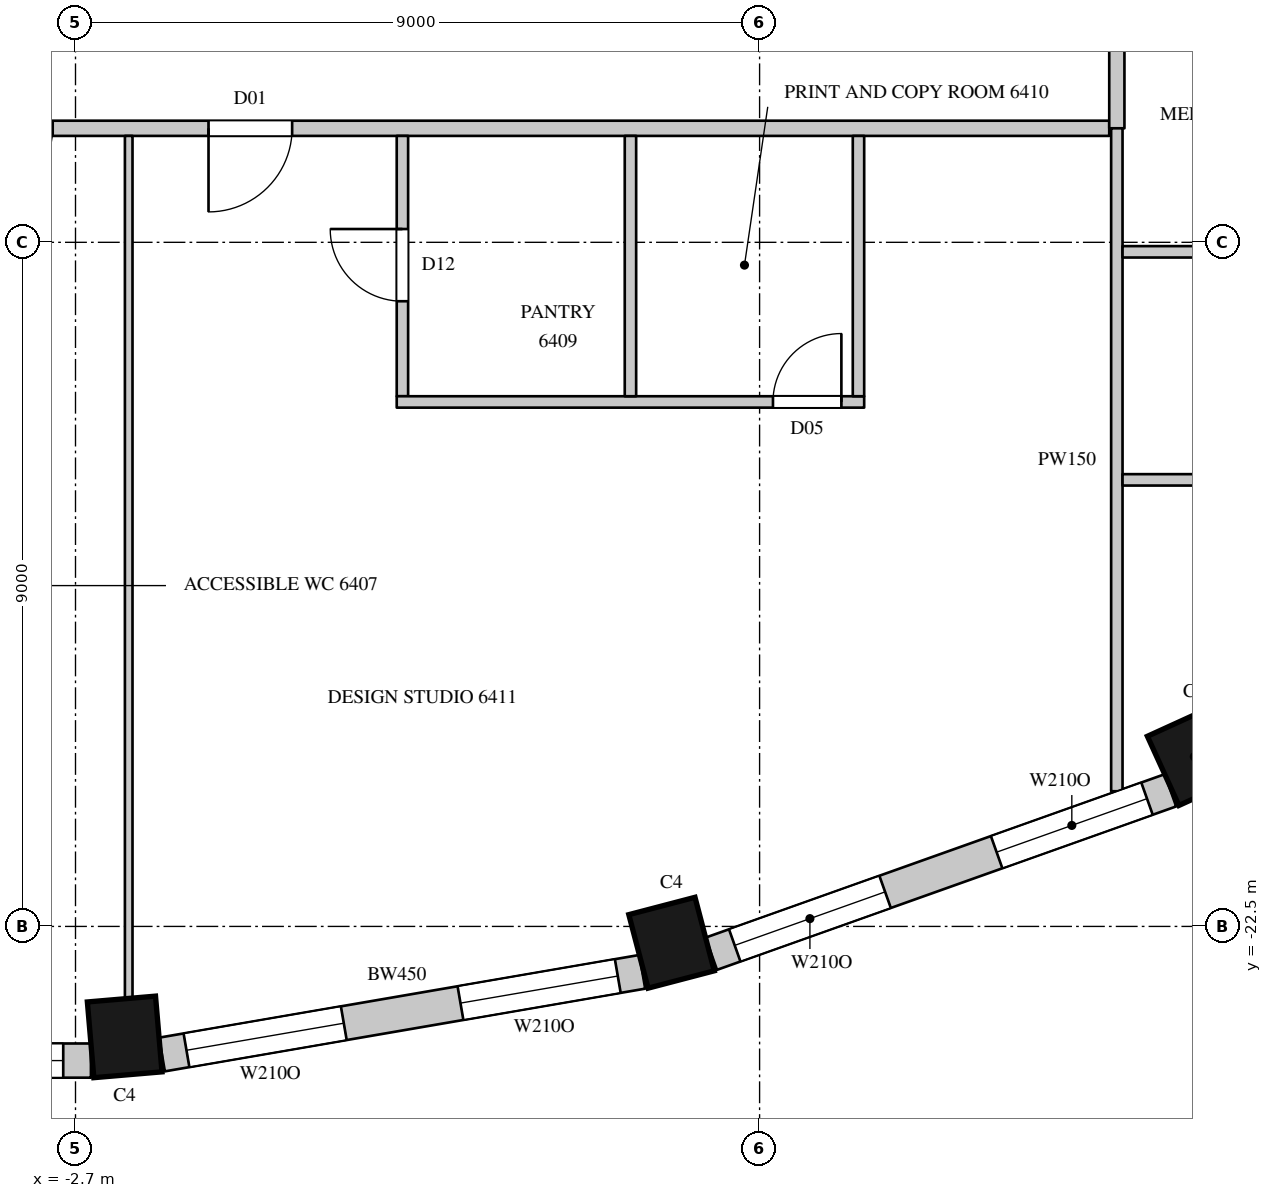
"""IFC4 building model, lengths in metres.
Left out: names, types, materials, properties, quantities, classifications, styles, units other than length and angle.
Written with IfcOpenShell. Run it as: python <this file> out.ifc"""

import sys

from ifc_helpers import new_model, si_unit, direction, frame, frame_2d, origin, origin_2d, place, context, subcontext, project, spatial, rectangle, extrude, element, fill, save


model = new_model("IFC4")
c1 = context("Model", 3, precision=1e-05, world=origin(), true_north=direction((0.0, 1.0)))
c2 = subcontext(c1, "Body", "Model", "MODEL_VIEW")
j1 = project(units=[si_unit("LENGTHUNIT", "METRE"), si_unit("PLANEANGLEUNIT", "RADIAN")], contexts=[c1])
p1 = place(None, origin())
s1 = spatial("IfcSite", under=j1, at=p1, CompositionType="ELEMENT")
p2 = place(p1, origin())
s2 = spatial("IfcBuilding", under=s1, at=p2, CompositionType="ELEMENT")
p3 = place(p2, frame((0.0, 0.0, 284.4)))
s3 = spatial("IfcBuildingStorey", under=s2, at=p3, CompositionType="ELEMENT", Elevation=284.4)
for number, where, z_axis, x_axis in (
    (1, (-2.053, -23.954, 0.0), (0.0, 0.0, 1.0), (0.996, 0.085, 0.0)),
    (2, (5.142, -22.715, 0.0), (0.0, 0.0, 1.0), (0.967, 0.253, 0.0)),
    (3, (12.019, -20.267, 0.0), (0.0, 0.0, 1.0), (0.91, 0.415, 0.0)),
):
    element("IfcColumn", number, at=place(p3, frame(where, z_axis=z_axis, x_axis=x_axis)), inside=s3, PredefinedType="COLUMN", context=c2, shape_type="SweptSolid", body=[
        extrude(rectangle(XDim=0.9, YDim=1.0, at=origin_2d()), origin(), (0.0, 0.0, 1.0), 4.1),
    ])
p4 = place(p3, frame((-8.903, -24.265, 0.0), z_axis=(0.0, 0.0, 1.0), x_axis=(1.0, 0.0, 0.0)))
e4 = element("IfcWall", 4, at=p4, inside=s3, PredefinedType="SOLIDWALL", context=c2, shape_type="SweptSolid", body=[
    extrude(rectangle(XDim=6.406, YDim=0.45, at=frame_2d((3.203, 0.0))), origin(), (0.0, 0.0, 1.0), 3.8),
])
p5 = place(p4, frame((1.514, 0.0, 1.05)))
e5 = element("IfcOpeningElement", 5, at=p5, cuts=e4, PredefinedType="OPENING", context=c2, shape_type="SweptSolid", body=[
    extrude(rectangle(XDim=0.9, YDim=2.4, at=frame_2d((0.45, 1.2))), frame((0.0, 0.235, 0.0), z_axis=(0.0, -1.0, 0.0), x_axis=(1.0, 0.0, 0.0)), (0.0, 0.0, 1.0), 0.47),
])
p6 = place(p4, frame((4.841, 0.0, 1.05)))
e6 = element("IfcOpeningElement", 6, at=p6, cuts=e4, PredefinedType="OPENING", context=c2, shape_type="SweptSolid", body=[
    extrude(rectangle(XDim=1.2, YDim=2.4, at=frame_2d((0.6, 1.2))), frame((0.0, 0.235, 0.0), z_axis=(0.0, -1.0, 0.0), x_axis=(1.0, 0.0, 0.0)), (0.0, 0.0, 1.0), 0.47),
])
p7 = place(p3, frame((-1.562, -24.185, 0.0), z_axis=(0.0, 0.0, 1.0), x_axis=(0.985502073964, 0.169663379113, 0.0)))
e7 = element("IfcWall", 7, at=p7, inside=s3, PredefinedType="SOLIDWALL", context=c2, shape_type="SweptSolid", body=[
    extrude(rectangle(XDim=6.412, YDim=0.45, at=frame_2d((3.206, 0.0))), origin(), (0.0, 0.0, 1.0), 3.8),
])
p8 = place(p7, frame((0.327, 0.0, 1.05)))
e8 = element("IfcOpeningElement", 8, at=p8, cuts=e7, PredefinedType="OPENING", context=c2, shape_type="SweptSolid", body=[
    extrude(rectangle(XDim=2.1, YDim=2.4, at=frame_2d((1.05, 1.2))), frame((0.0, 0.235, 0.0), z_axis=(0.0, -1.0, 0.0), x_axis=(1.0, 0.0, 0.0)), (0.0, 0.0, 1.0), 0.47),
])
p9 = place(p7, frame((3.985, 0.0, 1.05)))
e9 = element("IfcOpeningElement", 9, at=p9, cuts=e7, PredefinedType="OPENING", context=c2, shape_type="SweptSolid", body=[
    extrude(rectangle(XDim=2.1, YDim=2.4, at=frame_2d((1.05, 1.2))), frame((0.0, 0.235, 0.0), z_axis=(0.0, -1.0, 0.0), x_axis=(1.0, 0.0, 0.0)), (0.0, 0.0, 1.0), 0.47),
])
p10 = place(p3, frame((5.665, -22.859, 0.0), z_axis=(0.0, 0.0, 1.0), x_axis=(0.942108340262, 0.335308626803, 0.0)))
e10 = element("IfcWall", 10, at=p10, inside=s3, PredefinedType="SOLIDWALL", context=c2, shape_type="SweptSolid", body=[
    extrude(rectangle(XDim=6.412, YDim=0.45, at=frame_2d((3.206, 0.0))), origin(), (0.0, 0.0, 1.0), 3.8),
])
p11 = place(p10, frame((0.327, 0.0, 1.05)))
e11 = element("IfcOpeningElement", 11, at=p11, cuts=e10, PredefinedType="OPENING", context=c2, shape_type="SweptSolid", body=[
    extrude(rectangle(XDim=2.1, YDim=2.4, at=frame_2d((1.05, 1.2))), frame((0.0, 0.235, 0.0), z_axis=(0.0, -1.0, 0.0), x_axis=(1.0, 0.0, 0.0)), (0.0, 0.0, 1.0), 0.47),
])
p12 = place(p10, frame((3.985, 0.0, 1.05)))
e12 = element("IfcOpeningElement", 12, at=p12, cuts=e10, PredefinedType="OPENING", context=c2, shape_type="SweptSolid", body=[
    extrude(rectangle(XDim=2.1, YDim=2.4, at=frame_2d((1.05, 1.2))), frame((0.0, 0.235, 0.0), z_axis=(0.0, -1.0, 0.0), x_axis=(1.0, 0.0, 0.0)), (0.0, 0.0, 1.0), 0.47),
])
p13 = place(p3, frame((-10.9, -12.0, 0.0), z_axis=(0.0, 0.0, 1.0), x_axis=(1.0, 0.0, 0.0)))
e13 = element("IfcWall", 13, at=p13, inside=s3, PredefinedType="PARTITIONING", context=c2, shape_type="SweptSolid", body=[
    extrude(rectangle(XDim=21.8, YDim=0.2, at=frame_2d((10.9, 0.0))), origin(), (0.0, 0.0, 1.0), 3.8),
])
p14 = place(p13, frame((1.1, 0.0, 0.0)))
e14 = element("IfcOpeningElement", 14, at=p14, cuts=e13, PredefinedType="OPENING", context=c2, shape_type="SweptSolid", body=[
    extrude(rectangle(XDim=0.9, YDim=2.2, at=frame_2d((0.45, 1.1))), frame((0.0, 0.11, 0.0), z_axis=(0.0, -1.0, 0.0), x_axis=(1.0, 0.0, 0.0)), (0.0, 0.0, 1.0), 0.22),
])
p15 = place(p13, frame((4.9, 0.0, 0.0)))
e15 = element("IfcOpeningElement", 15, at=p15, cuts=e13, PredefinedType="OPENING", context=c2, shape_type="SweptSolid", body=[
    extrude(rectangle(XDim=0.9, YDim=2.2, at=frame_2d((0.45, 1.1))), frame((0.0, 0.11, 0.0), z_axis=(0.0, -1.0, 0.0), x_axis=(1.0, 0.0, 0.0)), (0.0, 0.0, 1.0), 0.22),
])
p16 = place(p13, frame((7.0, 0.0, 0.0)))
e16 = element("IfcOpeningElement", 16, at=p16, cuts=e13, PredefinedType="OPENING", context=c2, shape_type="SweptSolid", body=[
    extrude(rectangle(XDim=0.9, YDim=2.2, at=frame_2d((0.45, 1.1))), frame((0.0, 0.11, 0.0), z_axis=(0.0, -1.0, 0.0), x_axis=(1.0, 0.0, 0.0)), (0.0, 0.0, 1.0), 0.22),
])
p17 = place(p13, frame((9.95, 0.0, 0.0)))
e17 = element("IfcOpeningElement", 17, at=p17, cuts=e13, PredefinedType="OPENING", context=c2, shape_type="SweptSolid", body=[
    extrude(rectangle(XDim=1.1, YDim=2.4, at=frame_2d((0.55, 1.2))), frame((0.0, 0.11, 0.0), z_axis=(0.0, -1.0, 0.0), x_axis=(1.0, 0.0, 0.0)), (0.0, 0.0, 1.0), 0.22),
])
p18 = place(p3, frame((11.0, -12.0, 0.0), z_axis=(0.0, 0.0, 1.0), x_axis=(0.0, 1.0, 0.0)))
e18 = element("IfcWall", 18, at=p18, inside=s3, PredefinedType="PARTITIONING", context=c2, shape_type="SweptSolid", body=[
    extrude(rectangle(XDim=24.1, YDim=0.2, at=frame_2d((12.05, 0.0))), origin(), (0.0, 0.0, 1.0), 3.8),
])
p19 = place(p18, frame((9.85, 0.0, 0.0)))
e19 = element("IfcOpeningElement", 19, at=p19, cuts=e18, PredefinedType="OPENING", context=c2, shape_type="SweptSolid", body=[
    extrude(rectangle(XDim=1.5, YDim=2.4, at=frame_2d((0.75, 1.2))), frame((0.0, 0.11, 0.0), z_axis=(0.0, -1.0, 0.0), x_axis=(1.0, 0.0, 0.0)), (0.0, 0.0, 1.0), 0.22),
])
p20 = place(p18, frame((4.55, 0.0, 0.0)))
e20 = element("IfcOpeningElement", 20, at=p20, cuts=e18, PredefinedType="OPENING", context=c2, shape_type="SweptSolid", body=[
    extrude(rectangle(XDim=1.1, YDim=2.4, at=frame_2d((0.55, 1.2))), frame((0.0, 0.11, 0.0), z_axis=(0.0, -1.0, 0.0), x_axis=(1.0, 0.0, 0.0)), (0.0, 0.0, 1.0), 0.22),
])
p21 = place(p3, frame((1.601, -15.525, 0.0), z_axis=(0.0, 0.0, 1.0), x_axis=(0.0, 1.0, 0.0)))
e21 = element("IfcWall", 21, at=p21, inside=s3, PredefinedType="PARTITIONING", context=c2, shape_type="SweptSolid", body=[
    extrude(rectangle(XDim=3.425, YDim=0.15, at=frame_2d((1.712, 0.0))), origin(), (0.0, 0.0, 1.0), 3.8),
])
p22 = place(p21, frame((1.25, 0.0, 0.0)))
e22 = element("IfcOpeningElement", 22, at=p22, cuts=e21, PredefinedType="OPENING", context=c2, shape_type="SweptSolid", body=[
    extrude(rectangle(XDim=0.95, YDim=2.2, at=frame_2d((0.475, 1.1))), frame((0.0, 0.085, 0.0), z_axis=(0.0, -1.0, 0.0), x_axis=(1.0, 0.0, 0.0)), (0.0, 0.0, 1.0), 0.17),
])
p23 = place(p3, frame((1.526, -15.6, 0.0), z_axis=(0.0, 0.0, 1.0), x_axis=(1.0, 0.0, 0.0)))
e23 = element("IfcWall", 23, at=p23, inside=s3, PredefinedType="PARTITIONING", context=c2, shape_type="SweptSolid", body=[
    extrude(rectangle(XDim=6.15, YDim=0.15, at=frame_2d((3.075, 0.0))), origin(), (0.0, 0.0, 1.0), 3.8),
])
p24 = place(p23, frame((4.95, 0.0, 0.0)))
e24 = element("IfcOpeningElement", 24, at=p24, cuts=e23, PredefinedType="OPENING", context=c2, shape_type="SweptSolid", body=[
    extrude(rectangle(XDim=0.9, YDim=2.2, at=frame_2d((0.45, 1.1))), frame((0.0, 0.085, 0.0), z_axis=(0.0, -1.0, 0.0), x_axis=(1.0, 0.0, 0.0)), (0.0, 0.0, 1.0), 0.17),
])
for number, where, z_axis, x_axis in (
    (25, (4.601, -15.525, 0.0), (0.0, 0.0, 1.0), (0.0, 1.0, 0.0)),
    (26, (7.601, -15.525, 0.0), (0.0, 0.0, 1.0), (0.0, 1.0, 0.0)),
):
    element("IfcWall", number, at=place(p3, frame(where, z_axis=z_axis, x_axis=x_axis)), inside=s3, PredefinedType="PARTITIONING", context=c2, shape_type="SweptSolid", body=[
        extrude(rectangle(XDim=3.425, YDim=0.15, at=frame_2d((1.712, 0.0))), origin(), (0.0, 0.0, 1.0), 3.8),
    ])
p25 = place(p3, frame((11.0, -20.721, 0.0), z_axis=(0.0, 0.0, 1.0), x_axis=(0.0, 1.0, 0.0)))
e27 = element("IfcWall", 27, at=p25, inside=s3, PredefinedType="PARTITIONING", context=c2, shape_type="SweptSolid", body=[
    extrude(rectangle(XDim=8.721, YDim=0.15, at=frame_2d((4.361, 0.0))), origin(), (0.0, 0.0, 1.0), 3.8),
])
p26 = place(p3, frame((11.075, -16.625, 0.0), z_axis=(0.0, 0.0, 1.0), x_axis=(1.0, 0.0, 0.0)))
e28 = element("IfcWall", 28, at=p26, inside=s3, PredefinedType="PARTITIONING", context=c2, shape_type="SweptSolid", body=[
    extrude(rectangle(XDim=3.9, YDim=0.15, at=frame_2d((1.95, 0.0))), origin(), (0.0, 0.0, 1.0), 3.8),
])
p27 = place(p26, frame((1.4, 0.0, 0.0)))
e29 = element("IfcOpeningElement", 29, at=p27, cuts=e28, PredefinedType="OPENING", context=c2, shape_type="SweptSolid", body=[
    extrude(rectangle(XDim=0.95, YDim=2.2, at=frame_2d((0.475, 1.1))), frame((0.0, 0.085, 0.0), z_axis=(0.0, -1.0, 0.0), x_axis=(1.0, 0.0, 0.0)), (0.0, 0.0, 1.0), 0.17),
])
p28 = place(p3, frame((11.075, -13.625, 0.0), z_axis=(0.0, 0.0, 1.0), x_axis=(1.0, 0.0, 0.0)))
e30 = element("IfcWall", 30, at=p28, inside=s3, PredefinedType="PARTITIONING", context=c2, shape_type="SweptSolid", body=[
    extrude(rectangle(XDim=3.75, YDim=0.15, at=frame_2d((1.875, 0.0))), origin(), (0.0, 0.0, 1.0), 3.8),
])
p29 = place(p3, frame((-2.0, -23.447, 0.0), z_axis=(0.0, 0.0, 1.0), x_axis=(0.0, 1.0, 0.0)))
e31 = element("IfcWall", 31, at=p29, inside=s3, PredefinedType="PARTITIONING", context=c2, shape_type="SweptSolid", body=[
    extrude(rectangle(XDim=11.347, YDim=0.1, at=frame_2d((5.674, 0.0))), origin(), (0.0, 0.0, 1.0), 3.8),
])
p30 = place(p8, origin())
e32 = element("IfcWindow", 32, at=p30, inside=s3, PartitioningType="SINGLE_PANEL", PredefinedType="WINDOW", context=c2, shape_type="SweptSolid", body=[
    extrude(rectangle(XDim=2.1, YDim=2.4, at=frame_2d((1.05, 1.2))), frame((0.0, 0.135, 0.0), z_axis=(0.0, -1.0, 0.0), x_axis=(1.0, 0.0, 0.0)), (0.0, 0.0, 1.0), 0.06),
])
fill(e8, e32)
p31 = place(p9, origin())
e33 = element("IfcWindow", 33, at=p31, inside=s3, PartitioningType="SINGLE_PANEL", PredefinedType="WINDOW", context=c2, shape_type="SweptSolid", body=[
    extrude(rectangle(XDim=2.1, YDim=2.4, at=frame_2d((1.05, 1.2))), frame((0.0, 0.135, 0.0), z_axis=(0.0, -1.0, 0.0), x_axis=(1.0, 0.0, 0.0)), (0.0, 0.0, 1.0), 0.06),
])
fill(e9, e33)
p32 = place(p11, origin())
e34 = element("IfcWindow", 34, at=p32, inside=s3, PartitioningType="SINGLE_PANEL", PredefinedType="WINDOW", context=c2, shape_type="SweptSolid", body=[
    extrude(rectangle(XDim=2.1, YDim=2.4, at=frame_2d((1.05, 1.2))), frame((0.0, 0.135, 0.0), z_axis=(0.0, -1.0, 0.0), x_axis=(1.0, 0.0, 0.0)), (0.0, 0.0, 1.0), 0.06),
])
fill(e11, e34)
p33 = place(p12, origin())
e35 = element("IfcWindow", 35, at=p33, inside=s3, PartitioningType="SINGLE_PANEL", PredefinedType="WINDOW", context=c2, shape_type="SweptSolid", body=[
    extrude(rectangle(XDim=2.1, YDim=2.4, at=frame_2d((1.05, 1.2))), frame((0.0, 0.135, 0.0), z_axis=(0.0, -1.0, 0.0), x_axis=(1.0, 0.0, 0.0)), (0.0, 0.0, 1.0), 0.06),
])
fill(e12, e35)
p34 = place(p17, origin())
e36 = element("IfcDoor", 36, at=p34, inside=s3, OperationType="SINGLE_SWING_RIGHT", PredefinedType="DOOR", context=c2, shape_type="SweptSolid", body=[
    extrude(rectangle(XDim=1.1, YDim=2.4, at=frame_2d((0.55, 1.2))), frame((0.0, 0.025, 0.0), z_axis=(0.0, -1.0, 0.0), x_axis=(1.0, 0.0, 0.0)), (0.0, 0.0, 1.0), 0.05),
])
fill(e17, e36)
p35 = place(p22, origin())
e37 = element("IfcDoor", 37, at=p35, inside=s3, OperationType="SINGLE_SWING_RIGHT", PredefinedType="DOOR", context=c2, shape_type="SweptSolid", body=[
    extrude(rectangle(XDim=0.95, YDim=2.2, at=frame_2d((0.475, 1.1))), frame((0.0, 0.025, 0.0), z_axis=(0.0, -1.0, 0.0), x_axis=(1.0, 0.0, 0.0)), (0.0, 0.0, 1.0), 0.05),
])
fill(e22, e37)
p36 = place(p24, origin())
e38 = element("IfcDoor", 38, at=p36, inside=s3, OperationType="SINGLE_SWING_RIGHT", PredefinedType="DOOR", context=c2, shape_type="SweptSolid", body=[
    extrude(rectangle(XDim=0.9, YDim=2.2, at=frame_2d((0.45, 1.1))), frame((0.0, 0.025, 0.0), z_axis=(0.0, -1.0, 0.0), x_axis=(1.0, 0.0, 0.0)), (0.0, 0.0, 1.0), 0.05),
])
fill(e24, e38)
p37 = place(p6, origin())
e39 = element("IfcWindow", 39, at=p37, inside=s3, PartitioningType="SINGLE_PANEL", PredefinedType="WINDOW", context=c2, shape_type="SweptSolid", body=[
    extrude(rectangle(XDim=1.2, YDim=2.4, at=frame_2d((0.6, 1.2))), frame((0.0, 0.135, 0.0), z_axis=(0.0, -1.0, 0.0), x_axis=(1.0, 0.0, 0.0)), (0.0, 0.0, 1.0), 0.06),
])
fill(e6, e39)
save(model, sys.argv[1])
